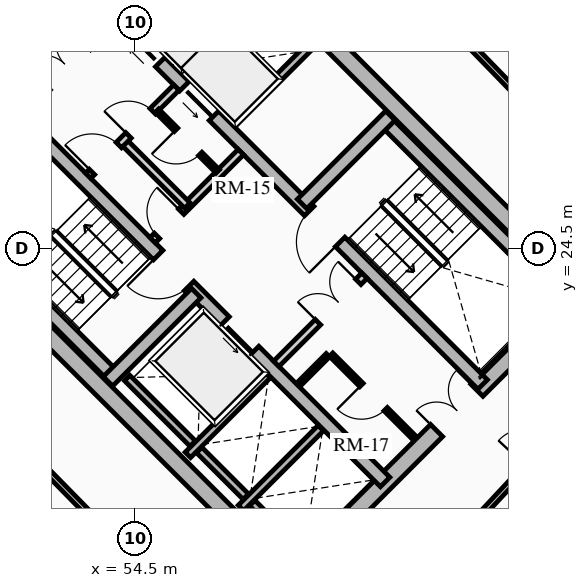
"""IFC4 building model, lengths in metres.
Left out: names, types, materials, properties, quantities, classifications, styles, units other than length and angle.
Written with IfcOpenShell. Run it as: python <this file> out.ifc"""

import sys

from ifc_helpers import new_model, si_unit, direction, frame, frame_2d, origin, place, context, subcontext, project, spatial, rectangle, extrude, source, transform, mapped, element, fill, save


model = new_model("IFC4")
c1 = context("Model", 3, precision=1e-05, world=origin(), true_north=direction((0.0, 1.0)))
c2 = subcontext(c1, "Body", "Model", "MODEL_VIEW")
j1 = project(units=[si_unit("LENGTHUNIT", "METRE"), si_unit("PLANEANGLEUNIT", "RADIAN")], contexts=[c1])
p1 = place(None, origin())
s1 = spatial("IfcSite", under=j1, at=p1, CompositionType="ELEMENT")
p2 = place(p1, origin())
s2 = spatial("IfcBuilding", under=s1, at=p2, CompositionType="ELEMENT")
p3 = place(p2, frame((0.0, 0.0, 70.15)))
s3 = spatial("IfcBuildingStorey", under=s2, at=p3, CompositionType="ELEMENT", Elevation=70.15)
for number, where, z_axis, x_axis in (
    (1, (58.737, 15.697, 0.0), (0.0, 0.0, 1.0), (-0.707, 0.707, 0.0)),
    (2, (66.303, 23.263, 0.0), (0.0, 0.0, 1.0), (-0.707, 0.707, 0.0)),
):
    element("IfcWall", number, at=place(p3, frame(where, z_axis=z_axis, x_axis=x_axis)), inside=s3, PredefinedType="SHEAR", context=c2, shape_type="SweptSolid", body=[
        extrude(rectangle(XDim=14.2, YDim=0.45, at=frame_2d((7.1, 0.0))), origin(), (0.0, 0.0, 1.0), 2.91),
    ])
p4 = place(p3, frame((58.578, 15.856, 0.0), z_axis=(0.0, 0.0, 1.0), x_axis=(0.707106781187, 0.707106781187, 0.0)))
e3 = element("IfcWall", 3, at=p4, inside=s3, PredefinedType="SHEAR", context=c2, shape_type="SweptSolid", body=[
    extrude(rectangle(XDim=10.7, YDim=0.45, at=frame_2d((5.35, 0.0))), origin(), (0.0, 0.0, 1.0), 2.91),
])
m1 = source(origin(), c2, "Body", "SweptSolid", [
    extrude(rectangle(XDim=1.5, YDim=2.02, at=frame_2d((0.75, 1.01))), frame((0.0, 0.235, 0.0), z_axis=(0.0, -1.0, 0.0), x_axis=(1.0, 0.0, 0.0)), (0.0, 0.0, 1.0), 0.47),
])
p5 = place(p4, frame((5.45, 0.0, 0.0)))
e4 = element("IfcOpeningElement", 4, at=p5, cuts=e3, PredefinedType="OPENING", context=c2, shape_type="MappedRepresentation", body=[
    mapped(m1, transform((0.0, 0.0, 0.0), x_axis=(1.0, 0.0, 0.0), y_axis=(0.0, 1.0, 0.0), z_axis=(0.0, 0.0, 1.0), scale=1.0)),
])
p6 = place(p3, frame((48.856, 25.578, 0.0), z_axis=(0.0, 0.0, 1.0), x_axis=(0.707106781187, 0.707106781187, 0.0)))
e5 = element("IfcWall", 5, at=p6, inside=s3, PredefinedType="SHEAR", context=c2, shape_type="SweptSolid", body=[
    extrude(rectangle(XDim=10.7, YDim=0.45, at=frame_2d((5.35, 0.0))), origin(), (0.0, 0.0, 1.0), 2.91),
])
p7 = place(p6, frame((4.6, 0.0, 0.0)))
e6 = element("IfcOpeningElement", 6, at=p7, cuts=e5, PredefinedType="OPENING", context=c2, shape_type="MappedRepresentation", body=[
    mapped(m1, transform((0.0, 0.0, 0.0), x_axis=(1.0, 0.0, 0.0), y_axis=(0.0, 1.0, 0.0), z_axis=(0.0, 0.0, 1.0), scale=1.0)),
])
p8 = place(p3, frame((61.078, 18.355, 0.0), z_axis=(0.0, 0.0, 1.0), x_axis=(-0.707106781187, 0.707106781187, 0.0)))
e7 = element("IfcWall", 7, at=p8, inside=s3, PredefinedType="SHEAR", context=c2, shape_type="SweptSolid", body=[
    extrude(rectangle(XDim=13.75, YDim=0.35, at=frame_2d((6.875, 0.0))), origin(), (0.0, 0.0, 1.0), 2.91),
])
m2 = source(origin(), c2, "Body", "SweptSolid", [
    extrude(rectangle(XDim=1.1, YDim=2.015, at=frame_2d((0.55, 1.007))), frame((0.0, 0.185, 0.0), z_axis=(0.0, -1.0, 0.0), x_axis=(1.0, 0.0, 0.0)), (0.0, 0.0, 1.0), 0.37),
])
p9 = place(p8, frame((4.875, 0.0, 0.0)))
e8 = element("IfcOpeningElement", 8, at=p9, cuts=e7, PredefinedType="OPENING", context=c2, shape_type="MappedRepresentation", body=[
    mapped(m2, transform((0.0, 0.0, 0.0), x_axis=(1.0, 0.0, 0.0), y_axis=(0.0, 1.0, 0.0), z_axis=(0.0, 0.0, 1.0), scale=1.0)),
])
m3 = source(origin(), c2, "Body", "SweptSolid", [
    extrude(rectangle(XDim=1.15, YDim=2.02, at=frame_2d((0.575, 1.01))), frame((0.0, 0.185, 0.0), z_axis=(0.0, -1.0, 0.0), x_axis=(1.0, 0.0, 0.0)), (0.0, 0.0, 1.0), 0.37),
])
p10 = place(p8, frame((7.295, 0.0, 0.0)))
e9 = element("IfcOpeningElement", 9, at=p10, cuts=e7, PredefinedType="OPENING", context=c2, shape_type="MappedRepresentation", body=[
    mapped(m3, transform((0.0, 0.0, 0.0), x_axis=(1.0, 0.0, 0.0), y_axis=(0.0, 1.0, 0.0), z_axis=(0.0, 0.0, 1.0), scale=1.0)),
])
p11 = place(p3, frame((63.645, 20.922, 0.0), z_axis=(0.0, 0.0, 1.0), x_axis=(-0.707106781187, 0.707106781187, 0.0)))
e10 = element("IfcWall", 10, at=p11, inside=s3, PredefinedType="SHEAR", context=c2, shape_type="SweptSolid", body=[
    extrude(rectangle(XDim=13.75, YDim=0.35, at=frame_2d((6.875, 0.0))), origin(), (0.0, 0.0, 1.0), 2.91),
])
p12 = place(p11, frame((10.0, 0.0, 0.0)))
e11 = element("IfcOpeningElement", 11, at=p12, cuts=e10, PredefinedType="OPENING", context=c2, shape_type="MappedRepresentation", body=[
    mapped(m2, transform((0.0, 0.0, 0.0), x_axis=(1.0, 0.0, 0.0), y_axis=(0.0, 1.0, 0.0), z_axis=(0.0, 0.0, 1.0), scale=1.0)),
])
p13 = place(p11, frame((12.0, 0.0, 0.0)))
e12 = element("IfcOpeningElement", 12, at=p13, cuts=e10, PredefinedType="OPENING", context=c2, shape_type="MappedRepresentation", body=[
    mapped(m2, transform((0.0, 0.0, 0.0), x_axis=(1.0, 0.0, 0.0), y_axis=(0.0, 1.0, 0.0), z_axis=(0.0, 0.0, 1.0), scale=1.0)),
])
p14 = place(p11, frame((5.305, 0.0, 0.0)))
e13 = element("IfcOpeningElement", 13, at=p14, cuts=e10, PredefinedType="OPENING", context=c2, shape_type="MappedRepresentation", body=[
    mapped(m3, transform((0.0, 0.0, 0.0), x_axis=(1.0, 0.0, 0.0), y_axis=(0.0, 1.0, 0.0), z_axis=(0.0, 0.0, 1.0), scale=1.0)),
])
p15 = place(p3, frame((53.922, 21.141, 0.0), z_axis=(0.0, 0.0, 1.0), x_axis=(-0.707088616009, 0.707124945897, 0.0)))
e14 = element("IfcWall", 14, at=p15, inside=s3, PredefinedType="SHEAR", context=c2, shape_type="SweptSolid", body=[
    extrude(rectangle(XDim=6.72, YDim=0.35, at=frame_2d((3.36, 0.0))), origin(), (0.0, 0.0, 1.0), 2.91),
])
p16 = place(p3, frame((53.784, 21.003, 0.0), z_axis=(0.0, 0.0, 1.0), x_axis=(0.707106781187, 0.707106781187, 0.0)))
e15 = element("IfcWall", 15, at=p16, inside=s3, PredefinedType="SHEAR", context=c2, shape_type="SweptSolid", body=[
    extrude(rectangle(XDim=3.285, YDim=0.35, at=frame_2d((1.643, 0.0))), origin(), (0.0, 0.0, 1.0), 2.91),
])
p17 = place(p3, frame((65.83, 23.107, 0.0), z_axis=(0.0, 0.0, 1.0), x_axis=(-0.707088616009, 0.707124945897, 0.0)))
e16 = element("IfcWall", 16, at=p17, inside=s3, PredefinedType="SHEAR", context=c2, shape_type="SweptSolid", body=[
    extrude(rectangle(XDim=6.72, YDim=0.35, at=frame_2d((3.36, 0.0))), origin(), (0.0, 0.0, 1.0), 2.91),
])
p18 = place(p3, frame((58.893, 25.674, 0.0), z_axis=(0.0, 0.0, 1.0), x_axis=(0.707106781187, 0.707106781187, 0.0)))
e17 = element("IfcWall", 17, at=p18, inside=s3, PredefinedType="SHEAR", context=c2, shape_type="SweptSolid", body=[
    extrude(rectangle(XDim=3.285, YDim=0.35, at=frame_2d((1.643, 0.0))), origin(), (0.0, 0.0, 1.0), 2.91),
])
p19 = place(p3, frame((55.888, 19.069, 0.0), z_axis=(0.0, 0.0, 1.0), x_axis=(0.707106781187, 0.707106781187, 0.0)))
e18 = element("IfcWall", 18, at=p19, inside=s3, PredefinedType="SHEAR", context=c2, shape_type="SweptSolid", body=[
    extrude(rectangle(XDim=2.97, YDim=0.2, at=frame_2d((1.485, 0.0))), origin(), (0.0, 0.0, 1.0), 2.91),
])
p20 = place(p3, frame((56.015, 19.366, 0.0), z_axis=(0.0, 0.0, 1.0), x_axis=(-0.707106781187, 0.707106781187, 0.0)))
e19 = element("IfcWall", 19, at=p20, inside=s3, PredefinedType="SHEAR", context=c2, shape_type="SweptSolid", body=[
    extrude(rectangle(XDim=2.44, YDim=0.2, at=frame_2d((1.22, 0.0))), origin(), (0.0, 0.0, 1.0), 2.91),
])
p21 = place(p3, frame((57.284, 17.673, 0.0), z_axis=(0.0, 0.0, 1.0), x_axis=(0.707147878904, 0.70706568108, 0.0)))
e20 = element("IfcWall", 20, at=p21, inside=s3, PredefinedType="SHEAR", context=c2, shape_type="SweptSolid", body=[
    extrude(rectangle(XDim=2.97, YDim=0.2, at=frame_2d((1.485, 0.0))), origin(), (0.0, 0.0, 1.0), 2.91),
])
p22 = place(p3, frame((57.412, 17.97, 0.0), z_axis=(0.0, 0.0, 1.0), x_axis=(-0.707106781187, 0.707106781187, 0.0)))
e21 = element("IfcWall", 21, at=p22, inside=s3, PredefinedType="SHEAR", context=c2, shape_type="SweptSolid", body=[
    extrude(rectangle(XDim=1.735, YDim=0.2, at=frame_2d((0.867, 0.0))), origin(), (0.0, 0.0, 1.0), 2.91),
])
p23 = place(p3, frame((58.737, 16.644, 0.0), z_axis=(0.0, 0.0, 1.0), x_axis=(-0.707032117043, 0.707181437447, 0.0)))
e22 = element("IfcWall", 22, at=p23, inside=s3, PredefinedType="SHEAR", context=c2, shape_type="SweptSolid", body=[
    extrude(rectangle(XDim=1.635, YDim=0.2, at=frame_2d((0.817, 0.0))), origin(), (0.0, 0.0, 1.0), 2.91),
])
p24 = place(p3, frame((57.062, 27.781, 0.0), z_axis=(0.0, 0.0, 1.0), x_axis=(0.707106781187, 0.707106781187, 0.0)))
e23 = element("IfcWall", 23, at=p24, inside=s3, PredefinedType="SHEAR", context=c2, shape_type="SweptSolid", body=[
    extrude(rectangle(XDim=2.97, YDim=0.2, at=frame_2d((1.485, 0.0))), origin(), (0.0, 0.0, 1.0), 2.91),
])
p25 = place(p3, frame((55.615, 29.227, 0.0), z_axis=(0.0, 0.0, 1.0), x_axis=(0.707147878904, 0.70706568108, 0.0)))
e24 = element("IfcWall", 24, at=p25, inside=s3, PredefinedType="SHEAR", context=c2, shape_type="SweptSolid", body=[
    extrude(rectangle(XDim=2.97, YDim=0.2, at=frame_2d((1.485, 0.0))), origin(), (0.0, 0.0, 1.0), 2.91),
])
p26 = place(p3, frame((58.214, 21.467, 0.0), z_axis=(0.0, 0.0, 1.0), x_axis=(0.707106781187, 0.707106781187, 0.0)))
e25 = element("IfcWall", 25, at=p26, inside=s3, PredefinedType="PARTITIONING", context=c2, shape_type="SweptSolid", body=[
    extrude(rectangle(XDim=3.28, YDim=0.2, at=frame_2d((1.64, 0.0))), origin(), (0.0, 0.0, 1.0), 2.655),
])
m4 = source(origin(), c2, "Body", "SweptSolid", [
    extrude(rectangle(XDim=1.5, YDim=2.02, at=frame_2d((0.75, 1.01))), frame((0.0, 0.11, 0.0), z_axis=(0.0, -1.0, 0.0), x_axis=(1.0, 0.0, 0.0)), (0.0, 0.0, 1.0), 0.22),
])
p27 = place(p26, frame((1.55, 0.0, 0.0)))
e26 = element("IfcOpeningElement", 26, at=p27, cuts=e25, PredefinedType="OPENING", context=c2, shape_type="MappedRepresentation", body=[
    mapped(m4, transform((0.0, 0.0, 0.0), x_axis=(1.0, 0.0, 0.0), y_axis=(0.0, 1.0, 0.0), z_axis=(0.0, 0.0, 1.0), scale=1.0)),
])
p28 = place(p3, frame((54.961, 24.719, 0.0), z_axis=(0.0, 0.0, 1.0), x_axis=(0.707106781187, 0.707106781187, 0.0)))
e27 = element("IfcWall", 27, at=p28, inside=s3, PredefinedType="PARTITIONING", context=c2, shape_type="SweptSolid", body=[
    extrude(rectangle(XDim=3.28, YDim=0.2, at=frame_2d((1.64, 0.0))), origin(), (0.0, 0.0, 1.0), 2.655),
])
m5 = source(origin(), c2, "Body", "SweptSolid", [
    extrude(rectangle(XDim=0.9, YDim=2.005, at=frame_2d((0.45, 1.002))), frame((0.0, 0.11, 0.0), z_axis=(0.0, -1.0, 0.0), x_axis=(1.0, 0.0, 0.0)), (0.0, 0.0, 1.0), 0.22),
])
p29 = place(p28, frame((0.16, 0.0, 0.0)))
e28 = element("IfcOpeningElement", 28, at=p29, cuts=e27, PredefinedType="OPENING", context=c2, shape_type="MappedRepresentation", body=[
    mapped(m5, transform((0.0, 0.0, 0.0), x_axis=(1.0, 0.0, 0.0), y_axis=(0.0, 1.0, 0.0), z_axis=(0.0, 0.0, 1.0), scale=1.0)),
])
p30 = place(p3, frame((55.874, 25.631, 0.0), z_axis=(0.0, 0.0, 1.0), x_axis=(-0.707157639372, 0.707055919343, 0.0)))
e29 = element("IfcWall", 29, at=p30, inside=s3, PredefinedType="PARTITIONING", context=c2, shape_type="SweptSolid", body=[
    extrude(rectangle(XDim=2.4, YDim=0.2, at=frame_2d((1.2, 0.0))), origin(), (0.0, 0.0, 1.0), 2.655),
])
p31 = place(p3, frame((53.264, 26.416, 0.0), z_axis=(0.0, 0.0, 1.0), x_axis=(0.707106781187, 0.707106781187, 0.0)))
e30 = element("IfcWall", 30, at=p31, inside=s3, PredefinedType="PARTITIONING", context=c2, shape_type="SweptSolid", body=[
    extrude(rectangle(XDim=3.28, YDim=0.2, at=frame_2d((1.64, 0.0))), origin(), (0.0, 0.0, 1.0), 2.655),
])
m6 = source(origin(), c2, "Body", "SweptSolid", [
    extrude(rectangle(XDim=1.0, YDim=2.015, at=frame_2d((0.5, 1.007))), frame((0.0, 0.11, 0.0), z_axis=(0.0, -1.0, 0.0), x_axis=(1.0, 0.0, 0.0)), (0.0, 0.0, 1.0), 0.22),
])
p32 = place(p31, frame((0.14, 0.0, 0.0)))
e31 = element("IfcOpeningElement", 31, at=p32, cuts=e30, PredefinedType="OPENING", context=c2, shape_type="MappedRepresentation", body=[
    mapped(m6, transform((0.0, 0.0, 0.0), x_axis=(1.0, 0.0, 0.0), y_axis=(0.0, 1.0, 0.0), z_axis=(0.0, 0.0, 1.0), scale=1.0)),
])
p33 = place(p31, frame((1.5, 0.0, 0.0)))
e32 = element("IfcOpeningElement", 32, at=p33, cuts=e30, PredefinedType="OPENING", context=c2, shape_type="MappedRepresentation", body=[
    mapped(m5, transform((0.0, 0.0, 0.0), x_axis=(1.0, 0.0, 0.0), y_axis=(0.0, 1.0, 0.0), z_axis=(0.0, 0.0, 1.0), scale=1.0)),
])
p34 = place(p3, frame((61.835, 19.529, 0.0), z_axis=(0.0, 0.0, 1.0), x_axis=(-0.707146413884, 0.707067146267, 0.0)))
e33 = element("IfcWall", 33, at=p34, inside=s3, PredefinedType="PARTITIONING", context=c2, shape_type="SweptSolid", body=[
    extrude(rectangle(XDim=3.08, YDim=0.125, at=frame_2d((1.54, 0.0))), origin(), (0.0, 0.0, 1.0), 2.655),
])
m7 = source(origin(), c2, "Body", "SweptSolid", [
    extrude(rectangle(XDim=0.9, YDim=2.005, at=frame_2d((0.45, 1.002))), frame((0.0, 0.073, 0.0), z_axis=(0.0, -1.0, 0.0), x_axis=(1.0, 0.0, 0.0)), (0.0, 0.0, 1.0), 0.145),
])
p35 = place(p34, frame((1.05, 0.0, 0.0)))
e34 = element("IfcOpeningElement", 34, at=p35, cuts=e33, PredefinedType="OPENING", context=c2, shape_type="MappedRepresentation", body=[
    mapped(m7, transform((0.0, 0.0, 0.0), x_axis=(1.0, 0.0, 0.0), y_axis=(0.0, 1.0, 0.0), z_axis=(0.0, 0.0, 1.0), scale=1.0)),
])
p36 = place(p3, frame((58.794, 20.915, 0.0), z_axis=(0.0, 0.0, 1.0), x_axis=(0.707106781187, 0.707106781187, 0.0)))
e35 = element("IfcWall", 35, at=p36, inside=s3, PredefinedType="PARTITIONING", context=c2, shape_type="SweptSolid", body=[
    extrude(rectangle(XDim=1.1, YDim=0.125, at=frame_2d((0.55, 0.0))), origin(), (0.0, 0.0, 1.0), 2.655),
])
p37 = place(p3, frame((56.673, 26.529, 0.0), z_axis=(0.0, 0.0, 1.0), x_axis=(-0.707052764397, 0.70716079385, 0.0)))
e36 = element("IfcWall", 36, at=p37, inside=s3, PredefinedType="PARTITIONING", context=c2, shape_type="SweptSolid", body=[
    extrude(rectangle(XDim=2.26, YDim=0.125, at=frame_2d((1.13, 0.0))), origin(), (0.0, 0.0, 1.0), 2.655),
])
p38 = place(p37, frame((0.65, 0.0, 0.0)))
e37 = element("IfcOpeningElement", 37, at=p38, cuts=e36, PredefinedType="OPENING", context=c2, shape_type="MappedRepresentation", body=[
    mapped(m7, transform((0.0, 0.0, 0.0), x_axis=(1.0, 0.0, 0.0), y_axis=(0.0, 1.0, 0.0), z_axis=(0.0, 0.0, 1.0), scale=1.0)),
])
p39 = place(p3, frame((51.914, 18.914, 0.0), z_axis=(0.0, 0.0, 1.0), x_axis=(0.6999614951, -0.71418058317, 0.0)))
e38 = element("IfcWall", 38, at=p39, inside=s3, PredefinedType="PARTITIONING", context=c2, shape_type="SweptSolid", body=[
    extrude(rectangle(XDim=6.13, YDim=0.15, at=frame_2d((3.065, 0.0))), origin(), (0.0, 0.0, 1.0), 2.225),
])
m8 = source(origin(), c2, "Body", "SweptSolid", [
    extrude(rectangle(XDim=1.05, YDim=2.015, at=frame_2d((0.525, 1.007))), frame((0.0, 0.085, 0.0), z_axis=(0.0, -1.0, 0.0), x_axis=(1.0, 0.0, 0.0)), (0.0, 0.0, 1.0), 0.17),
])
p40 = place(p39, frame((2.54, 0.0, 0.0)))
e39 = element("IfcOpeningElement", 39, at=p40, cuts=e38, PredefinedType="OPENING", context=c2, shape_type="MappedRepresentation", body=[
    mapped(m8, transform((0.0, 0.0, 0.0), x_axis=(1.0, 0.0, 0.0), y_axis=(0.0, 1.0, 0.0), z_axis=(0.0, 0.0, 1.0), scale=1.0)),
])
p41 = place(p3, frame((62.867, 16.702, 0.0), z_axis=(0.0, 0.0, 1.0), x_axis=(0.682449206191, 0.73093302085, 0.0)))
e40 = element("IfcWall", 40, at=p41, inside=s3, PredefinedType="PARTITIONING", context=c2, shape_type="SweptSolid", body=[
    extrude(rectangle(XDim=6.642, YDim=0.15, at=frame_2d((3.321, 0.0))), origin(), (0.0, 0.0, 1.0), 2.225),
])
m9 = source(origin(), c2, "Body", "SweptSolid", [
    extrude(rectangle(XDim=1.0, YDim=2.015, at=frame_2d((0.5, 1.007))), frame((0.0, 0.085, 0.0), z_axis=(0.0, -1.0, 0.0), x_axis=(1.0, 0.0, 0.0)), (0.0, 0.0, 1.0), 0.17),
])
p42 = place(p41, frame((2.821, 0.0, 0.0)))
e41 = element("IfcOpeningElement", 41, at=p42, cuts=e40, PredefinedType="OPENING", context=c2, shape_type="MappedRepresentation", body=[
    mapped(m9, transform((0.0, 0.0, 0.0), x_axis=(1.0, 0.0, 0.0), y_axis=(0.0, 1.0, 0.0), z_axis=(0.0, 0.0, 1.0), scale=1.0)),
])
p43 = place(p3, frame((67.247, 25.802, 0.0), z_axis=(0.0, 0.0, 1.0), x_axis=(-0.696771261687, 0.71729339108, 0.0)))
e42 = element("IfcWall", 42, at=p43, inside=s3, PredefinedType="PARTITIONING", context=c2, shape_type="SweptSolid", body=[
    extrude(rectangle(XDim=5.972, YDim=0.15, at=frame_2d((2.986, 0.0))), origin(), (0.0, 0.0, 1.0), 2.655),
])
m10 = source(origin(), c2, "Body", "SweptSolid", [
    extrude(rectangle(XDim=1.1, YDim=2.015, at=frame_2d((0.55, 1.007))), frame((0.0, 0.025, 0.0), z_axis=(0.0, -1.0, 0.0), x_axis=(1.0, 0.0, 0.0)), (0.0, 0.0, 1.0), 0.05),
])
p44 = place(p9, origin())
e43 = element("IfcDoor", 43, at=p44, inside=s3, OperationType="SLIDING_TO_LEFT", PredefinedType="DOOR", context=c2, shape_type="MappedRepresentation", body=[
    mapped(m10, transform((0.0, 0.0, 0.0), x_axis=(1.0, 0.0, 0.0), y_axis=(0.0, 1.0, 0.0), z_axis=(0.0, 0.0, 1.0), scale=1.0)),
])
fill(e8, e43)
p45 = place(p12, origin())
e44 = element("IfcDoor", 44, at=p45, inside=s3, OperationType="SLIDING_TO_LEFT", PredefinedType="DOOR", context=c2, shape_type="MappedRepresentation", body=[
    mapped(m10, transform((0.0, 0.0, 0.0), x_axis=(1.0, 0.0, 0.0), y_axis=(0.0, 1.0, 0.0), z_axis=(0.0, 0.0, 1.0), scale=1.0)),
])
fill(e11, e44)
p46 = place(p13, origin())
e45 = element("IfcDoor", 45, at=p46, inside=s3, OperationType="SLIDING_TO_RIGHT", PredefinedType="DOOR", context=c2, shape_type="MappedRepresentation", body=[
    mapped(m10, transform((0.0, 0.0, 0.0), x_axis=(1.0, 0.0, 0.0), y_axis=(0.0, 1.0, 0.0), z_axis=(0.0, 0.0, 1.0), scale=1.0)),
])
fill(e12, e45)
m11 = source(origin(), c2, "Body", "SweptSolid", [
    extrude(rectangle(XDim=1.15, YDim=2.02, at=frame_2d((0.575, 1.01))), frame((0.0, 0.025, 0.0), z_axis=(0.0, -1.0, 0.0), x_axis=(1.0, 0.0, 0.0)), (0.0, 0.0, 1.0), 0.05),
])
p47 = place(p10, origin())
e46 = element("IfcDoor", 46, at=p47, inside=s3, OperationType="SINGLE_SWING_RIGHT", PredefinedType="DOOR", context=c2, shape_type="MappedRepresentation", body=[
    mapped(m11, transform((0.0, 0.0, 0.0), x_axis=(1.0, 0.0, 0.0), y_axis=(0.0, 1.0, 0.0), z_axis=(0.0, 0.0, 1.0), scale=1.0)),
])
fill(e9, e46)
p48 = place(p14, origin())
e47 = element("IfcDoor", 47, at=p48, inside=s3, OperationType="SINGLE_SWING_LEFT", PredefinedType="DOOR", context=c2, shape_type="MappedRepresentation", body=[
    mapped(m11, transform((0.0, 0.0, 0.0), x_axis=(1.0, 0.0, 0.0), y_axis=(0.0, 1.0, 0.0), z_axis=(0.0, 0.0, 1.0), scale=1.0)),
])
fill(e13, e47)
m12 = source(origin(), c2, "Body", "SweptSolid", [
    extrude(rectangle(XDim=1.5, YDim=2.02, at=frame_2d((0.75, 1.01))), frame((0.0, 0.025, 0.0), z_axis=(0.0, -1.0, 0.0), x_axis=(1.0, 0.0, 0.0)), (0.0, 0.0, 1.0), 0.05),
])
p49 = place(p7, origin())
e48 = element("IfcDoor", 48, at=p49, inside=s3, OperationType="DOUBLE_DOOR_SINGLE_SWING", PredefinedType="DOOR", context=c2, shape_type="MappedRepresentation", body=[
    mapped(m12, transform((0.0, 0.0, 0.0), x_axis=(1.0, 0.0, 0.0), y_axis=(0.0, 1.0, 0.0), z_axis=(0.0, 0.0, 1.0), scale=1.0)),
])
fill(e6, e48)
p50 = place(p5, origin())
e49 = element("IfcDoor", 49, at=p50, inside=s3, OperationType="DOUBLE_DOOR_SINGLE_SWING", PredefinedType="DOOR", context=c2, shape_type="MappedRepresentation", body=[
    mapped(m12, transform((0.0, 0.0, 0.0), x_axis=(1.0, 0.0, 0.0), y_axis=(0.0, 1.0, 0.0), z_axis=(0.0, 0.0, 1.0), scale=1.0)),
])
fill(e4, e49)
p51 = place(p27, origin())
e50 = element("IfcDoor", 50, at=p51, inside=s3, OperationType="DOUBLE_DOOR_SINGLE_SWING", PredefinedType="DOOR", context=c2, shape_type="MappedRepresentation", body=[
    mapped(m12, transform((0.0, 0.0, 0.0), x_axis=(1.0, 0.0, 0.0), y_axis=(0.0, 1.0, 0.0), z_axis=(0.0, 0.0, 1.0), scale=1.0)),
])
fill(e26, e50)
m13 = source(origin(), c2, "Body", "SweptSolid", [
    extrude(rectangle(XDim=0.9, YDim=2.005, at=frame_2d((0.45, 1.002))), frame((0.0, 0.025, 0.0), z_axis=(0.0, -1.0, 0.0), x_axis=(1.0, 0.0, 0.0)), (0.0, 0.0, 1.0), 0.05),
])
p52 = place(p29, origin())
e51 = element("IfcDoor", 51, at=p52, inside=s3, OperationType="SINGLE_SWING_RIGHT", PredefinedType="DOOR", context=c2, shape_type="MappedRepresentation", body=[
    mapped(m13, transform((0.0, 0.0, 0.0), x_axis=(1.0, 0.0, 0.0), y_axis=(0.0, 1.0, 0.0), z_axis=(0.0, 0.0, 1.0), scale=1.0)),
])
fill(e28, e51)
m14 = source(origin(), c2, "Body", "SweptSolid", [
    extrude(rectangle(XDim=1.0, YDim=2.015, at=frame_2d((0.5, 1.007))), frame((0.0, 0.025, 0.0), z_axis=(0.0, -1.0, 0.0), x_axis=(1.0, 0.0, 0.0)), (0.0, 0.0, 1.0), 0.05),
])
p53 = place(p32, origin())
e52 = element("IfcDoor", 52, at=p53, inside=s3, OperationType="SINGLE_SWING_LEFT", PredefinedType="DOOR", context=c2, shape_type="MappedRepresentation", body=[
    mapped(m14, transform((0.0, 0.0, 0.0), x_axis=(1.0, 0.0, 0.0), y_axis=(0.0, 1.0, 0.0), z_axis=(0.0, 0.0, 1.0), scale=1.0)),
])
fill(e31, e52)
p54 = place(p35, origin())
e53 = element("IfcDoor", 53, at=p54, inside=s3, OperationType="SINGLE_SWING_RIGHT", PredefinedType="DOOR", context=c2, shape_type="MappedRepresentation", body=[
    mapped(m13, transform((0.0, 0.0, 0.0), x_axis=(1.0, 0.0, 0.0), y_axis=(0.0, 1.0, 0.0), z_axis=(0.0, 0.0, 1.0), scale=1.0)),
])
fill(e34, e53)
p55 = place(p33, origin())
e54 = element("IfcDoor", 54, at=p55, inside=s3, OperationType="SINGLE_SWING_LEFT", PredefinedType="DOOR", context=c2, shape_type="MappedRepresentation", body=[
    mapped(m13, transform((0.0, 0.0, 0.0), x_axis=(1.0, 0.0, 0.0), y_axis=(0.0, 1.0, 0.0), z_axis=(0.0, 0.0, 1.0), scale=1.0)),
])
fill(e32, e54)
p56 = place(p38, origin())
e55 = element("IfcDoor", 55, at=p56, inside=s3, OperationType="SINGLE_SWING_RIGHT", PredefinedType="DOOR", context=c2, shape_type="MappedRepresentation", body=[
    mapped(m13, transform((0.0, 0.0, 0.0), x_axis=(1.0, 0.0, 0.0), y_axis=(0.0, 1.0, 0.0), z_axis=(0.0, 0.0, 1.0), scale=1.0)),
])
fill(e37, e55)
save(model, sys.argv[1])
